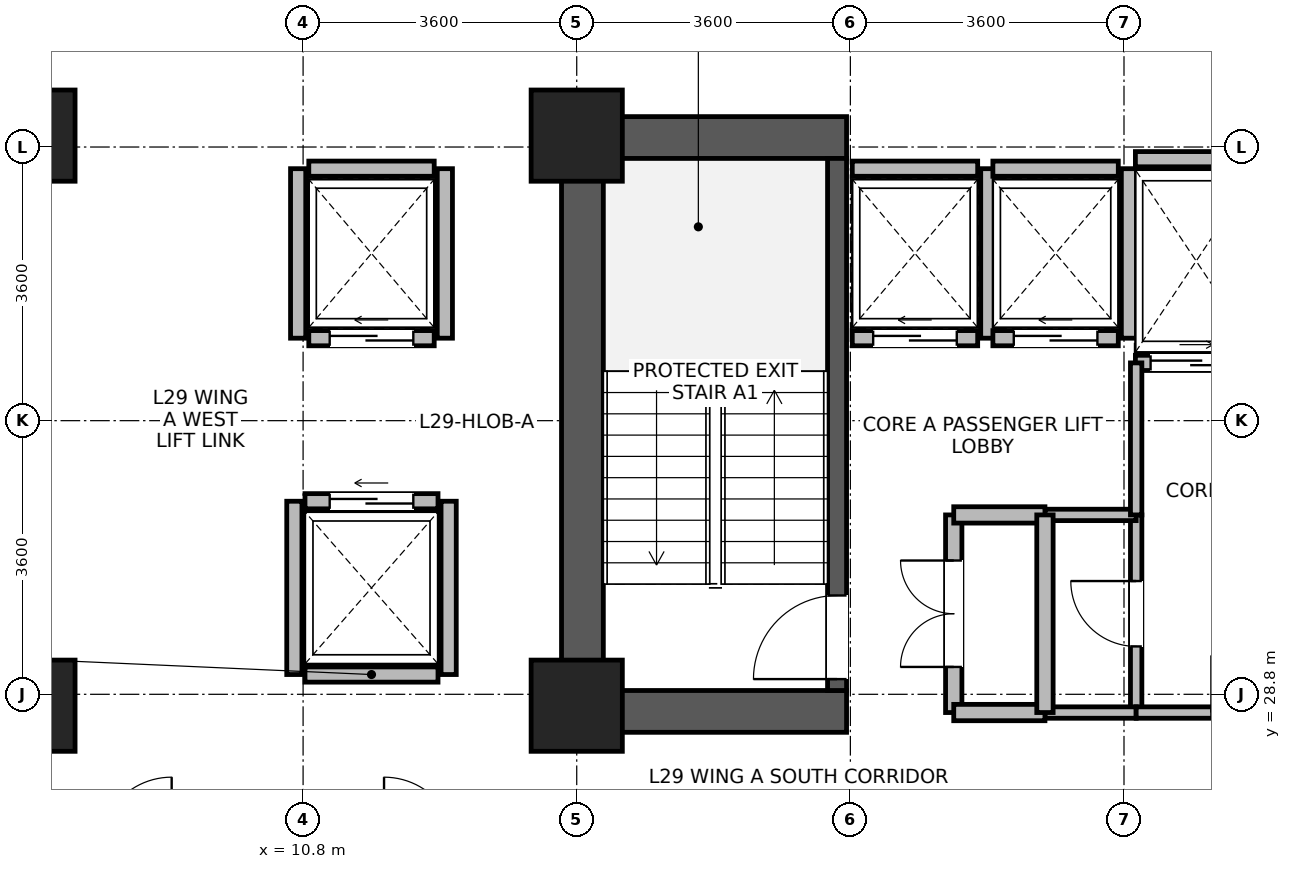
"""IFC4 building model, lengths in metres.
Left out: names, types, materials, properties, quantities, classifications, styles, units other than length and angle.
Written with IfcOpenShell. Run it as: python <this file> out.ifc"""

import sys

from ifc_helpers import new_model, si_unit, direction, frame, frame_2d, origin, origin_2d, place, context, subcontext, project, spatial, rectangle, extrude, source, transform, mapped, element, fill, save


model = new_model("IFC4")
c1 = context("Model", 3, precision=1e-05, world=origin(), true_north=direction((0.0, 1.0)))
c2 = subcontext(c1, "Body", "Model", "MODEL_VIEW")
j1 = project(units=[si_unit("LENGTHUNIT", "METRE"), si_unit("PLANEANGLEUNIT", "RADIAN")], contexts=[c1])
p1 = place(None, origin())
s1 = spatial("IfcSite", under=j1, at=p1, CompositionType="ELEMENT")
p2 = place(p1, origin())
s2 = spatial("IfcBuilding", under=s1, at=p2, CompositionType="ELEMENT")
p3 = place(p2, frame((0.0, 0.0, 115.6)))
s3 = spatial("IfcBuildingStorey", under=s2, at=p3, CompositionType="ELEMENT", Elevation=115.6)
p4 = place(p3, frame((14.475, 28.3, 0.0), z_axis=(0.0, 0.0, 1.0), x_axis=(0.0, 1.0, 0.0)))
e1 = element("IfcWall", 1, at=p4, inside=s3, PredefinedType="SHEAR", context=c2, shape_type="SweptSolid", body=[
    extrude(rectangle(XDim=8.1, YDim=0.55, at=frame_2d((4.05, 0.0))), origin(), (0.0, 0.0, 1.0), 3.45),
])
for number, where, z_axis, x_axis in (
    (2, (14.75, 28.575, 0.0), (0.0, 0.0, 1.0), (1.0, 0.0, 0.0)),
    (3, (14.75, 36.125, 0.0), (0.0, 0.0, 1.0), (1.0, 0.0, 0.0)),
):
    element("IfcWall", number, at=place(p3, frame(where, z_axis=z_axis, x_axis=x_axis)), inside=s3, PredefinedType="SHEAR", context=c2, shape_type="SweptSolid", body=[
        extrude(rectangle(XDim=3.2, YDim=0.55, at=frame_2d((1.6, 0.0))), origin(), (0.0, 0.0, 1.0), 3.45),
    ])
p5 = place(p3, frame((17.825, 28.85, 0.0), z_axis=(0.0, 0.0, 1.0), x_axis=(0.0, 1.0, 0.0)))
e4 = element("IfcWall", 4, at=p5, inside=s3, PredefinedType="SHEAR", context=c2, shape_type="SweptSolid", body=[
    extrude(rectangle(XDim=7.0, YDim=0.25, at=frame_2d((3.5, 0.0))), origin(), (0.0, 0.0, 1.0), 3.45),
])
p6 = place(p5, frame((0.15, 0.0, 0.0)))
e5 = element("IfcOpeningElement", 5, at=p6, cuts=e4, PredefinedType="OPENING", context=c2, shape_type="SweptSolid", body=[
    extrude(rectangle(XDim=1.1, YDim=2.08, at=frame_2d((0.55, 1.04))), frame((0.0, 0.135, 0.0), z_axis=(0.0, -1.0, 0.0), x_axis=(1.0, 0.0, 0.0)), (0.0, 0.0, 1.0), 0.27),
])
m1 = source(origin(), c2, "Body", "SweptSolid", [
    extrude(rectangle(XDim=1.2, YDim=1.2, at=origin_2d()), origin(), (0.0, 0.0, 1.0), 3.7),
])
for number, where, z_axis, x_axis in (
    (6, (7.2, 28.65, 0.0), (0.0, 0.0, 1.0), (1.0, 0.0, 0.0)),
    (7, (7.2, 36.15, 0.0), (0.0, 0.0, 1.0), (1.0, 0.0, 0.0)),
    (8, (14.4, 28.65, 0.0), (0.0, 0.0, 1.0), (1.0, 0.0, 0.0)),
    (9, (14.4, 36.15, 0.0), (0.0, 0.0, 1.0), (1.0, 0.0, 0.0)),
):
    element("IfcColumn", number, at=place(p3, frame(where, z_axis=z_axis, x_axis=x_axis)), inside=s3, PredefinedType="COLUMN", context=c2, shape_type="MappedRepresentation", body=[
        mapped(m1, transform((0.0, 0.0, 0.0), x_axis=(1.0, 0.0, 0.0), y_axis=(0.0, 1.0, 0.0), z_axis=(0.0, 0.0, 1.0), scale=1.0)),
    ])
p7 = place(p3, frame((18.025, 33.485, 0.0), z_axis=(0.0, 0.0, 1.0), x_axis=(1.0, 0.0, 0.0)))
e10 = element("IfcWall", 10, at=p7, inside=s3, PredefinedType="PARTITIONING", context=c2, shape_type="SweptSolid", body=[
    extrude(rectangle(XDim=1.65, YDim=0.2, at=frame_2d((0.825, 0.0))), origin(), (0.0, 0.0, 1.0), 3.43),
])
p8 = place(p7, frame((0.275, 0.0, 0.0)))
e11 = element("IfcOpeningElement", 11, at=p8, cuts=e10, PredefinedType="OPENING", context=c2, shape_type="SweptSolid", body=[
    extrude(rectangle(XDim=1.1, YDim=2.12, at=frame_2d((0.55, 1.06))), frame((0.0, 0.11, 0.0), z_axis=(0.0, -1.0, 0.0), x_axis=(1.0, 0.0, 0.0)), (0.0, 0.0, 1.0), 0.22),
])
p9 = place(p3, frame((18.025, 35.715, 0.0), z_axis=(0.0, 0.0, 1.0), x_axis=(1.0, 0.0, 0.0)))
e12 = element("IfcWall", 12, at=p9, inside=s3, PredefinedType="PARTITIONING", context=c2, shape_type="SweptSolid", body=[
    extrude(rectangle(XDim=1.65, YDim=0.2, at=frame_2d((0.825, 0.0))), origin(), (0.0, 0.0, 1.0), 3.43),
])
p10 = place(p3, frame((19.815, 33.485, 0.0), z_axis=(0.0, 0.0, 1.0), x_axis=(0.0, 1.0, 0.0)))
e13 = element("IfcWall", 13, at=p10, inside=s3, PredefinedType="PARTITIONING", context=c2, shape_type="SweptSolid", body=[
    extrude(rectangle(XDim=2.23, YDim=0.2, at=frame_2d((1.115, 0.0))), origin(), (0.0, 0.0, 1.0), 3.43),
])
p11 = place(p3, frame((19.875, 33.485, 0.0), z_axis=(0.0, 0.0, 1.0), x_axis=(1.0, 0.0, 0.0)))
e14 = element("IfcWall", 14, at=p11, inside=s3, PredefinedType="PARTITIONING", context=c2, shape_type="SweptSolid", body=[
    extrude(rectangle(XDim=1.65, YDim=0.2, at=frame_2d((0.825, 0.0))), origin(), (0.0, 0.0, 1.0), 3.43),
])
p12 = place(p11, frame((0.275, 0.0, 0.0)))
e15 = element("IfcOpeningElement", 15, at=p12, cuts=e14, PredefinedType="OPENING", context=c2, shape_type="SweptSolid", body=[
    extrude(rectangle(XDim=1.1, YDim=2.12, at=frame_2d((0.55, 1.06))), frame((0.0, 0.11, 0.0), z_axis=(0.0, -1.0, 0.0), x_axis=(1.0, 0.0, 0.0)), (0.0, 0.0, 1.0), 0.22),
])
p13 = place(p3, frame((19.875, 35.715, 0.0), z_axis=(0.0, 0.0, 1.0), x_axis=(1.0, 0.0, 0.0)))
e16 = element("IfcWall", 16, at=p13, inside=s3, PredefinedType="PARTITIONING", context=c2, shape_type="SweptSolid", body=[
    extrude(rectangle(XDim=1.65, YDim=0.2, at=frame_2d((0.825, 0.0))), origin(), (0.0, 0.0, 1.0), 3.43),
])
p14 = place(p3, frame((21.665, 33.485, 0.0), z_axis=(0.0, 0.0, 1.0), x_axis=(0.0, 1.0, 0.0)))
e17 = element("IfcWall", 17, at=p14, inside=s3, PredefinedType="PARTITIONING", context=c2, shape_type="SweptSolid", body=[
    extrude(rectangle(XDim=2.23, YDim=0.2, at=frame_2d((1.115, 0.0))), origin(), (0.0, 0.0, 1.0), 3.43),
])
p15 = place(p3, frame((10.825, 29.06, 0.0), z_axis=(0.0, 0.0, 1.0), x_axis=(1.0, 0.0, 0.0)))
e18 = element("IfcWall", 18, at=p15, inside=s3, PredefinedType="PARTITIONING", context=c2, shape_type="SweptSolid", body=[
    extrude(rectangle(XDim=1.75, YDim=0.2, at=frame_2d((0.875, 0.0))), origin(), (0.0, 0.0, 1.0), 3.43),
])
p16 = place(p3, frame((10.825, 31.34, 0.0), z_axis=(0.0, 0.0, 1.0), x_axis=(1.0, 0.0, 0.0)))
e19 = element("IfcWall", 19, at=p16, inside=s3, PredefinedType="PARTITIONING", context=c2, shape_type="SweptSolid", body=[
    extrude(rectangle(XDim=1.75, YDim=0.2, at=frame_2d((0.875, 0.0))), origin(), (0.0, 0.0, 1.0), 3.43),
])
p17 = place(p16, frame((0.325, 0.0, 0.0)))
e20 = element("IfcOpeningElement", 20, at=p17, cuts=e19, PredefinedType="OPENING", context=c2, shape_type="SweptSolid", body=[
    extrude(rectangle(XDim=1.1, YDim=2.12, at=frame_2d((0.55, 1.06))), frame((0.0, 0.11, 0.0), z_axis=(0.0, -1.0, 0.0), x_axis=(1.0, 0.0, 0.0)), (0.0, 0.0, 1.0), 0.22),
])
for number, where, z_axis, x_axis in (
    (21, (10.685, 29.06, 0.0), (0.0, 0.0, 1.0), (0.0, 1.0, 0.0)),
    (22, (12.715, 29.06, 0.0), (0.0, 0.0, 1.0), (0.0, 1.0, 0.0)),
):
    element("IfcWall", number, at=place(p3, frame(where, z_axis=z_axis, x_axis=x_axis)), inside=s3, PredefinedType="PARTITIONING", context=c2, shape_type="SweptSolid", body=[
        extrude(rectangle(XDim=2.28, YDim=0.2, at=frame_2d((1.14, 0.0))), origin(), (0.0, 0.0, 1.0), 3.43),
    ])
p18 = place(p3, frame((10.875, 33.485, 0.0), z_axis=(0.0, 0.0, 1.0), x_axis=(1.0, 0.0, 0.0)))
e23 = element("IfcWall", 23, at=p18, inside=s3, PredefinedType="PARTITIONING", context=c2, shape_type="SweptSolid", body=[
    extrude(rectangle(XDim=1.65, YDim=0.2, at=frame_2d((0.825, 0.0))), origin(), (0.0, 0.0, 1.0), 3.43),
])
p19 = place(p18, frame((0.275, 0.0, 0.0)))
e24 = element("IfcOpeningElement", 24, at=p19, cuts=e23, PredefinedType="OPENING", context=c2, shape_type="SweptSolid", body=[
    extrude(rectangle(XDim=1.1, YDim=2.12, at=frame_2d((0.55, 1.06))), frame((0.0, 0.11, 0.0), z_axis=(0.0, -1.0, 0.0), x_axis=(1.0, 0.0, 0.0)), (0.0, 0.0, 1.0), 0.22),
])
p20 = place(p3, frame((10.875, 35.715, 0.0), z_axis=(0.0, 0.0, 1.0), x_axis=(1.0, 0.0, 0.0)))
e25 = element("IfcWall", 25, at=p20, inside=s3, PredefinedType="PARTITIONING", context=c2, shape_type="SweptSolid", body=[
    extrude(rectangle(XDim=1.65, YDim=0.2, at=frame_2d((0.825, 0.0))), origin(), (0.0, 0.0, 1.0), 3.43),
])
for number, where, z_axis, x_axis in (
    (26, (10.735, 33.485, 0.0), (0.0, 0.0, 1.0), (0.0, 1.0, 0.0)),
    (27, (12.665, 33.485, 0.0), (0.0, 0.0, 1.0), (0.0, 1.0, 0.0)),
):
    element("IfcWall", number, at=place(p3, frame(where, z_axis=z_axis, x_axis=x_axis)), inside=s3, PredefinedType="PARTITIONING", context=c2, shape_type="SweptSolid", body=[
        extrude(rectangle(XDim=2.23, YDim=0.2, at=frame_2d((1.115, 0.0))), origin(), (0.0, 0.0, 1.0), 3.43),
    ])
p21 = place(p3, frame((21.75, 33.16, 0.0), z_axis=(0.0, 0.0, 1.0), x_axis=(1.0, 0.0, 0.0)))
e28 = element("IfcWall", 28, at=p21, inside=s3, PredefinedType="PARTITIONING", context=c2, shape_type="SweptSolid", body=[
    extrude(rectangle(XDim=1.6, YDim=0.2, at=frame_2d((0.8, 0.0))), origin(), (0.0, 0.0, 1.0), 3.43),
])
p22 = place(p21, frame((0.2, 0.0, 0.0)))
e29 = element("IfcOpeningElement", 29, at=p22, cuts=e28, PredefinedType="OPENING", context=c2, shape_type="SweptSolid", body=[
    extrude(rectangle(XDim=1.2, YDim=2.12, at=frame_2d((0.6, 1.06))), frame((0.0, 0.11, 0.0), z_axis=(0.0, -1.0, 0.0), x_axis=(1.0, 0.0, 0.0)), (0.0, 0.0, 1.0), 0.22),
])
p23 = place(p3, frame((21.75, 35.84, 0.0), z_axis=(0.0, 0.0, 1.0), x_axis=(1.0, 0.0, 0.0)))
e30 = element("IfcWall", 30, at=p23, inside=s3, PredefinedType="PARTITIONING", context=c2, shape_type="SweptSolid", body=[
    extrude(rectangle(XDim=1.6, YDim=0.2, at=frame_2d((0.8, 0.0))), origin(), (0.0, 0.0, 1.0), 2.43),
])
p24 = place(p3, frame((19.36, 28.56, 0.0), z_axis=(0.0, 0.0, 1.0), x_axis=(0.0, 1.0, 0.0)))
e31 = element("IfcWall", 31, at=p24, inside=s3, PredefinedType="PARTITIONING", context=c2, shape_type="SweptSolid", body=[
    extrude(rectangle(XDim=2.6, YDim=0.215, at=frame_2d((1.3, 0.0))), origin(), (0.0, 0.0, 1.0), 3.43),
])
p25 = place(p24, frame((0.6, 0.0, 0.0)))
e32 = element("IfcOpeningElement", 32, at=p25, cuts=e31, PredefinedType="OPENING", context=c2, shape_type="SweptSolid", body=[
    extrude(rectangle(XDim=1.4, YDim=2.15, at=frame_2d((0.7, 1.075))), frame((0.0, 0.118, 0.0), z_axis=(0.0, -1.0, 0.0), x_axis=(1.0, 0.0, 0.0)), (0.0, 0.0, 1.0), 0.235),
])
p26 = place(p3, frame((21.76, 28.56, 0.0), z_axis=(0.0, 0.0, 1.0), x_axis=(0.0, 1.0, 0.0)))
e33 = element("IfcWall", 33, at=p26, inside=s3, PredefinedType="PARTITIONING", context=c2, shape_type="SweptSolid", body=[
    extrude(rectangle(XDim=2.6, YDim=0.15, at=frame_2d((1.3, 0.0))), origin(), (0.0, 0.0, 1.0), 3.43),
])
p27 = place(p26, frame((0.87, 0.0, 0.0)))
e34 = element("IfcOpeningElement", 34, at=p27, cuts=e33, PredefinedType="OPENING", context=c2, shape_type="SweptSolid", body=[
    extrude(rectangle(XDim=0.86, YDim=2.02, at=frame_2d((0.43, 1.01))), frame((0.0, 0.085, 0.0), z_axis=(0.0, -1.0, 0.0), x_axis=(1.0, 0.0, 0.0)), (0.0, 0.0, 1.0), 0.17),
])
p28 = place(p3, frame((20.56, 28.56, 0.0), z_axis=(0.0, 0.0, 1.0), x_axis=(1.0, 0.0, 0.0)))
e35 = element("IfcWall", 35, at=p28, inside=s3, PredefinedType="PARTITIONING", context=c2, shape_type="SweptSolid", body=[
    extrude(rectangle(XDim=1.2, YDim=0.15, at=frame_2d((0.6, 0.0))), origin(), (0.0, 0.0, 1.0), 2.43),
])
p29 = place(p3, frame((20.56, 31.16, 0.0), z_axis=(0.0, 0.0, 1.0), x_axis=(1.0, 0.0, 0.0)))
e36 = element("IfcWall", 36, at=p29, inside=s3, PredefinedType="PARTITIONING", context=c2, shape_type="SweptSolid", body=[
    extrude(rectangle(XDim=1.2, YDim=0.15, at=frame_2d((0.6, 0.0))), origin(), (0.0, 0.0, 1.0), 3.43),
])
p30 = place(p3, frame((19.36, 28.56, 0.0), z_axis=(0.0, 0.0, 1.0), x_axis=(1.0, 0.0, 0.0)))
e37 = element("IfcWall", 37, at=p30, inside=s3, PredefinedType="PARTITIONING", context=c2, shape_type="SweptSolid", body=[
    extrude(rectangle(XDim=1.2, YDim=0.215, at=frame_2d((0.6, 0.0))), origin(), (0.0, 0.0, 1.0), 2.43),
])
p31 = place(p3, frame((19.36, 31.16, 0.0), z_axis=(0.0, 0.0, 1.0), x_axis=(1.0, 0.0, 0.0)))
e38 = element("IfcWall", 38, at=p31, inside=s3, PredefinedType="PARTITIONING", context=c2, shape_type="SweptSolid", body=[
    extrude(rectangle(XDim=1.2, YDim=0.215, at=frame_2d((0.6, 0.0))), origin(), (0.0, 0.0, 1.0), 3.43),
])
p32 = place(p3, frame((21.76, 28.56, 0.0), z_axis=(0.0, 0.0, 1.0), x_axis=(1.0, 0.0, 0.0)))
e39 = element("IfcWall", 39, at=p32, inside=s3, PredefinedType="PARTITIONING", context=c2, shape_type="SweptSolid", body=[
    extrude(rectangle(XDim=3.48, YDim=0.15, at=frame_2d((1.74, 0.0))), origin(), (0.0, 0.0, 1.0), 2.43),
])
p33 = place(p32, frame((0.99, 0.0, 0.0)))
e40 = element("IfcOpeningElement", 40, at=p33, cuts=e39, PredefinedType="OPENING", context=c2, shape_type="SweptSolid", body=[
    extrude(rectangle(XDim=1.5, YDim=2.1, at=frame_2d((0.75, 1.05))), frame((0.0, 0.085, 0.0), z_axis=(0.0, -1.0, 0.0), x_axis=(1.0, 0.0, 0.0)), (0.0, 0.0, 1.0), 0.17),
])
p34 = place(p3, frame((20.56, 28.56, 0.0), z_axis=(0.0, 0.0, 1.0), x_axis=(0.0, 1.0, 0.0)))
e41 = element("IfcWall", 41, at=p34, inside=s3, PredefinedType="PARTITIONING", context=c2, shape_type="SweptSolid", body=[
    extrude(rectangle(XDim=2.6, YDim=0.215, at=frame_2d((1.3, 0.0))), origin(), (0.0, 0.0, 1.0), 3.43),
])
p35 = place(p3, frame((21.76, 31.16, 0.0), z_axis=(0.0, 0.0, 1.0), x_axis=(0.0, 1.0, 0.0)))
e42 = element("IfcWall", 42, at=p35, inside=s3, PredefinedType="PARTITIONING", context=c2, shape_type="SweptSolid", body=[
    extrude(rectangle(XDim=2.0, YDim=0.15, at=frame_2d((1.0, 0.0))), origin(), (0.0, 0.0, 1.0), 3.43),
])
p36 = place(p6, origin())
e43 = element("IfcDoor", 43, at=p36, inside=s3, OperationType="SINGLE_SWING_LEFT", PredefinedType="DOOR", context=c2, shape_type="SweptSolid", body=[
    extrude(rectangle(XDim=1.1, YDim=2.08, at=frame_2d((0.55, 1.04))), frame((0.0, 0.025, 0.0), z_axis=(0.0, -1.0, 0.0), x_axis=(1.0, 0.0, 0.0)), (0.0, 0.0, 1.0), 0.05),
])
fill(e5, e43)
p37 = place(p8, origin())
e44 = element("IfcDoor", 44, at=p37, inside=s3, OperationType="SLIDING_TO_LEFT", PredefinedType="DOOR", context=c2, shape_type="SweptSolid", body=[
    extrude(rectangle(XDim=1.1, YDim=2.12, at=frame_2d((0.55, 1.06))), frame((0.0, 0.025, 0.0), z_axis=(0.0, -1.0, 0.0), x_axis=(1.0, 0.0, 0.0)), (0.0, 0.0, 1.0), 0.05),
])
fill(e11, e44)
p38 = place(p12, origin())
e45 = element("IfcDoor", 45, at=p38, inside=s3, OperationType="SLIDING_TO_LEFT", PredefinedType="DOOR", context=c2, shape_type="SweptSolid", body=[
    extrude(rectangle(XDim=1.1, YDim=2.12, at=frame_2d((0.55, 1.06))), frame((0.0, 0.025, 0.0), z_axis=(0.0, -1.0, 0.0), x_axis=(1.0, 0.0, 0.0)), (0.0, 0.0, 1.0), 0.05),
])
fill(e15, e45)
p39 = place(p17, origin())
e46 = element("IfcDoor", 46, at=p39, inside=s3, OperationType="SLIDING_TO_LEFT", PredefinedType="DOOR", context=c2, shape_type="SweptSolid", body=[
    extrude(rectangle(XDim=1.1, YDim=2.12, at=frame_2d((0.55, 1.06))), frame((0.0, 0.025, 0.0), z_axis=(0.0, -1.0, 0.0), x_axis=(1.0, 0.0, 0.0)), (0.0, 0.0, 1.0), 0.05),
])
fill(e20, e46)
p40 = place(p19, origin())
e47 = element("IfcDoor", 47, at=p40, inside=s3, OperationType="SLIDING_TO_LEFT", PredefinedType="DOOR", context=c2, shape_type="SweptSolid", body=[
    extrude(rectangle(XDim=1.1, YDim=2.12, at=frame_2d((0.55, 1.06))), frame((0.0, 0.025, 0.0), z_axis=(0.0, -1.0, 0.0), x_axis=(1.0, 0.0, 0.0)), (0.0, 0.0, 1.0), 0.05),
])
fill(e24, e47)
p41 = place(p22, origin())
e48 = element("IfcDoor", 48, at=p41, inside=s3, OperationType="SLIDING_TO_RIGHT", PredefinedType="DOOR", context=c2, shape_type="SweptSolid", body=[
    extrude(rectangle(XDim=1.2, YDim=2.12, at=frame_2d((0.6, 1.06))), frame((0.0, 0.025, 0.0), z_axis=(0.0, -1.0, 0.0), x_axis=(1.0, 0.0, 0.0)), (0.0, 0.0, 1.0), 0.05),
])
fill(e29, e48)
p42 = place(p25, origin())
e49 = element("IfcDoor", 49, at=p42, inside=s3, OperationType="DOUBLE_DOOR_SINGLE_SWING", PredefinedType="DOOR", context=c2, shape_type="SweptSolid", body=[
    extrude(rectangle(XDim=1.4, YDim=2.15, at=frame_2d((0.7, 1.075))), frame((0.0, 0.025, 0.0), z_axis=(0.0, -1.0, 0.0), x_axis=(1.0, 0.0, 0.0)), (0.0, 0.0, 1.0), 0.05),
])
fill(e32, e49)
p43 = place(p27, origin())
e50 = element("IfcDoor", 50, at=p43, inside=s3, OperationType="SINGLE_SWING_RIGHT", PredefinedType="DOOR", context=c2, shape_type="SweptSolid", body=[
    extrude(rectangle(XDim=0.86, YDim=2.02, at=frame_2d((0.43, 1.01))), frame((0.0, 0.025, 0.0), z_axis=(0.0, -1.0, 0.0), x_axis=(1.0, 0.0, 0.0)), (0.0, 0.0, 1.0), 0.05),
])
fill(e34, e50)
save(model, sys.argv[1])
